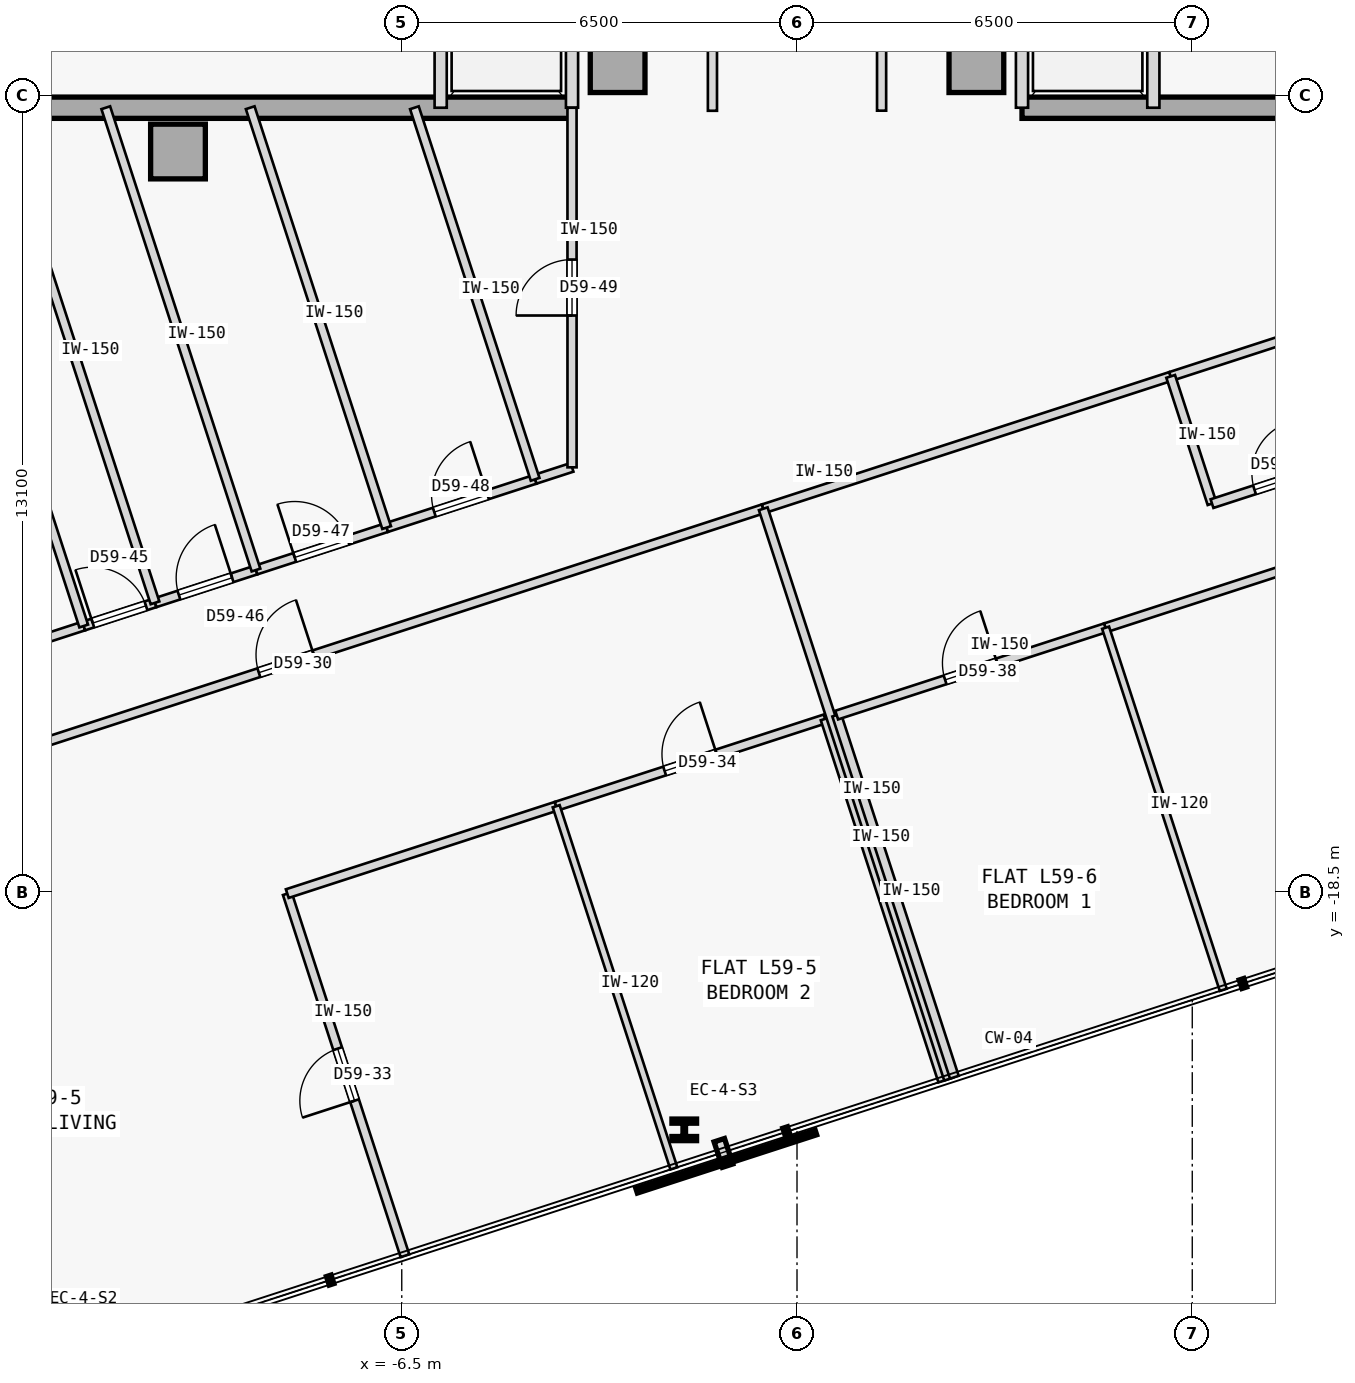
"""IFC4 building model, lengths in metres.
Left out: names, types, materials, properties, quantities, classifications, styles, units other than length and angle.
Written with IfcOpenShell. Run it as: python <this file> out.ifc"""

import sys

from ifc_helpers import new_model, si_unit, direction, frame, frame_2d, origin, origin_2d, place, context, subcontext, project, spatial, rectangle, i_section, extrude, element, fill, save


model = new_model("IFC4")
c1 = context("Model", 3, precision=1e-05, world=origin(), true_north=direction((0.0, 1.0)))
c2 = subcontext(c1, "Body", "Model", "MODEL_VIEW")
j1 = project(units=[si_unit("LENGTHUNIT", "METRE"), si_unit("PLANEANGLEUNIT", "RADIAN")], contexts=[c1])
p1 = place(None, origin())
s1 = spatial("IfcSite", under=j1, at=p1, CompositionType="ELEMENT")
p2 = place(p1, origin())
s2 = spatial("IfcBuilding", under=s1, at=p2, CompositionType="ELEMENT")
p3 = place(p2, frame((0.0, 0.0, 224.3)))
s3 = spatial("IfcBuildingStorey", under=s2, at=p3, CompositionType="ELEMENT", Elevation=224.3)
for number, where, z_axis, x_axis in (
    (1, (-10.18, -6.32, 0.0), (0.0, 0.0, 1.0), (1.0, 0.0, 0.0)),
    (2, (-2.95, -4.9, 0.0), (0.0, 0.0, 1.0), (1.0, 0.0, 0.0)),
    (3, (2.95, -4.9, 0.0), (0.0, 0.0, 1.0), (1.0, 0.0, 0.0)),
):
    element("IfcColumn", number, at=place(p3, frame(where, z_axis=z_axis, x_axis=x_axis)), inside=s3, PredefinedType="COLUMN", context=c2, shape_type="SweptSolid", body=[
        extrude(rectangle(XDim=0.9, YDim=0.9, at=origin_2d()), origin(), (0.0, 0.0, 1.0), 3.35),
    ])
for number, where, z_axis, x_axis in (
    (4, (-14.56, -5.6, 0.0), (0.0, 0.0, 1.0), (1.0, 0.0, 0.0)),
    (5, (3.7, -5.6, 0.0), (0.0, 0.0, 1.0), (1.0, 0.0, 0.0)),
):
    element("IfcWall", number, at=place(p3, frame(where, z_axis=z_axis, x_axis=x_axis)), inside=s3, PredefinedType="SHEAR", context=c2, shape_type="SweptSolid", body=[
        extrude(rectangle(XDim=10.86, YDim=0.35, at=frame_2d((5.43, 0.0))), origin(), (0.0, 0.0, 1.0), 3.125),
    ])
p4 = place(p3, frame((-1.854, -22.409, 0.0), z_axis=(0.0, 0.0, 1.0), x_axis=(1.0, 0.0, 0.0)))
e6 = element("IfcColumn", 6, at=p4, inside=s3, PredefinedType="COLUMN", context=c2, shape_type="SweptSolid", body=[
    extrude(i_section(OverallWidth=0.405, OverallDepth=0.355, WebThickness=0.042, FlangeThickness=0.068, FilletRadius=0.015, at=origin_2d()), origin(), (0.0, 0.0, 1.0), 3.35),
])
for number, where, z_axis, x_axis in (
    (7, (-3.7, -5.6, 0.0), (0.0, 0.0, 1.0), (0.0, 1.0, 0.0)),
    (8, (-5.86, -5.6, 0.0), (0.0, 0.0, 1.0), (0.0, 1.0, 0.0)),
    (9, (3.7, -5.6, 0.0), (0.0, 0.0, 1.0), (0.0, 1.0, 0.0)),
    (10, (5.86, -5.6, 0.0), (0.0, 0.0, 1.0), (0.0, 1.0, 0.0)),
):
    element("IfcWall", number, at=place(p3, frame(where, z_axis=z_axis, x_axis=x_axis)), inside=s3, PredefinedType="STANDARD", context=c2, shape_type="SweptSolid", body=[
        extrude(rectangle(XDim=2.65, YDim=0.2, at=frame_2d((1.325, 0.0))), origin(), (0.0, 0.0, 1.0), 3.125),
    ])
p5 = place(p3, frame((-1.391, -5.65, 0.0), z_axis=(0.0, 0.0, 1.0), x_axis=(-8.6422954e-05, 0.999999996266, 0.0)))
e11 = element("IfcWall", 11, at=p5, inside=s3, PredefinedType="PARTITIONING", context=c2, shape_type="SweptSolid", body=[
    extrude(rectangle(XDim=11.3, YDim=0.15, at=frame_2d((5.65, 0.0))), origin(), (0.0, 0.0, 1.0), 3.125),
])
p6 = place(p5, frame((5.175, 0.0, 0.0)))
e12 = element("IfcOpeningElement", 12, at=p6, cuts=e11, PredefinedType="OPENING", context=c2, shape_type="SweptSolid", body=[
    extrude(rectangle(XDim=0.95, YDim=2.15, at=frame_2d((0.475, 1.075))), frame((0.0, 0.085, 0.0), z_axis=(0.0, -1.0, 0.0), x_axis=(1.0, 0.0, 0.0)), (0.0, 0.0, 1.0), 0.17),
])
p7 = place(p3, frame((1.391, -5.648, 0.0), z_axis=(0.0, 0.0, 1.0), x_axis=(-4.3218947e-05, 0.999999999066, 0.0)))
e13 = element("IfcWall", 13, at=p7, inside=s3, PredefinedType="PARTITIONING", context=c2, shape_type="SweptSolid", body=[
    extrude(rectangle(XDim=11.298, YDim=0.15, at=frame_2d((5.649, 0.0))), origin(), (0.0, 0.0, 1.0), 3.125),
])
p8 = place(p3, frame((-16.242, -17.292, 0.0), z_axis=(0.0, 0.0, 1.0), x_axis=(0.951056800106, 0.309016120894, 0.0)))
e14 = element("IfcWall", 14, at=p8, inside=s3, PredefinedType="PARTITIONING", context=c2, shape_type="SweptSolid", body=[
    extrude(rectangle(XDim=16.494, YDim=0.15, at=frame_2d((8.247, 0.0))), origin(), (0.0, 0.0, 1.0), 3.125),
])
p9 = place(p8, frame((7.772, 0.0, 0.0)))
e15 = element("IfcOpeningElement", 15, at=p9, cuts=e14, PredefinedType="OPENING", context=c2, shape_type="SweptSolid", body=[
    extrude(rectangle(XDim=0.95, YDim=2.15, at=frame_2d((0.475, 1.075))), frame((0.0, 0.085, 0.0), z_axis=(0.0, -1.0, 0.0), x_axis=(1.0, 0.0, 0.0)), (0.0, 0.0, 1.0), 0.17),
])
p10 = place(p3, frame((-0.555, -12.195, 0.0), z_axis=(0.0, 0.0, 1.0), x_axis=(0.951057495482, 0.309013980732, 0.0)))
e16 = element("IfcWall", 16, at=p10, inside=s3, PredefinedType="PARTITIONING", context=c2, shape_type="SweptSolid", body=[
    extrude(rectangle(XDim=7.045, YDim=0.15, at=frame_2d((3.522, 0.0))), origin(), (0.0, 0.0, 1.0), 3.125),
])
p11 = place(p3, frame((6.145, -10.018, 0.0), z_axis=(0.0, 0.0, 1.0), x_axis=(0.951035595692, 0.309081373955, 0.0)))
e17 = element("IfcWall", 17, at=p11, inside=s3, PredefinedType="PARTITIONING", context=c2, shape_type="SweptSolid", body=[
    extrude(rectangle(XDim=2.35, YDim=0.15, at=frame_2d((1.175, 0.0))), origin(), (0.0, 0.0, 1.0), 3.125),
])
p12 = place(p3, frame((-29.45, -19.881, 0.0), z_axis=(0.0, 0.0, 1.0), x_axis=(0.95105650271, 0.309017036186, 0.0)))
e18 = element("IfcWall", 18, at=p12, inside=s3, PredefinedType="PARTITIONING", context=c2, shape_type="SweptSolid", body=[
    extrude(rectangle(XDim=18.632, YDim=0.15, at=frame_2d((9.316, 0.0))), origin(), (0.0, 0.0, 1.0), 3.125),
])
p13 = place(p12, frame((8.856, 0.0, 0.0)))
e19 = element("IfcOpeningElement", 19, at=p13, cuts=e18, PredefinedType="OPENING", context=c2, shape_type="SweptSolid", body=[
    extrude(rectangle(XDim=0.92, YDim=2.15, at=frame_2d((0.46, 1.075))), frame((0.0, 0.085, 0.0), z_axis=(0.0, -1.0, 0.0), x_axis=(1.0, 0.0, 0.0)), (0.0, 0.0, 1.0), 0.17),
])
p14 = place(p3, frame((-11.73, -14.123, 0.0), z_axis=(0.0, 0.0, 1.0), x_axis=(0.951032613602, 0.309090549622, 0.0)))
e20 = element("IfcWall", 20, at=p14, inside=s3, PredefinedType="PARTITIONING", context=c2, shape_type="SweptSolid", body=[
    extrude(rectangle(XDim=1.233, YDim=0.15, at=frame_2d((0.616, 0.0))), origin(), (0.0, 0.0, 1.0), 3.125),
])
p15 = place(p14, frame((0.156, 0.0, 0.0)))
e21 = element("IfcOpeningElement", 21, at=p15, cuts=e20, PredefinedType="OPENING", context=c2, shape_type="SweptSolid", body=[
    extrude(rectangle(XDim=0.92, YDim=2.15, at=frame_2d((0.46, 1.075))), frame((0.0, 0.085, 0.0), z_axis=(0.0, -1.0, 0.0), x_axis=(1.0, 0.0, 0.0)), (0.0, 0.0, 1.0), 0.17),
])
p16 = place(p3, frame((-10.558, -13.742, 0.0), z_axis=(0.0, 0.0, 1.0), x_axis=(0.951060780507, 0.309003870173, 0.0)))
e22 = element("IfcWall", 22, at=p16, inside=s3, PredefinedType="PARTITIONING", context=c2, shape_type="SweptSolid", body=[
    extrude(rectangle(XDim=1.746, YDim=0.15, at=frame_2d((0.873, 0.0))), origin(), (0.0, 0.0, 1.0), 3.125),
])
p17 = place(p16, frame((0.413, 0.0, 0.0)))
e23 = element("IfcOpeningElement", 23, at=p17, cuts=e22, PredefinedType="OPENING", context=c2, shape_type="SweptSolid", body=[
    extrude(rectangle(XDim=0.92, YDim=2.15, at=frame_2d((0.46, 1.075))), frame((0.0, 0.085, 0.0), z_axis=(0.0, -1.0, 0.0), x_axis=(1.0, 0.0, 0.0)), (0.0, 0.0, 1.0), 0.17),
])
p18 = place(p3, frame((-8.897, -13.202, 0.0), z_axis=(0.0, 0.0, 1.0), x_axis=(0.951065832698, 0.308988319964, 0.0)))
e24 = element("IfcWall", 24, at=p18, inside=s3, PredefinedType="PARTITIONING", context=c2, shape_type="SweptSolid", body=[
    extrude(rectangle(XDim=2.259, YDim=0.15, at=frame_2d((1.129, 0.0))), origin(), (0.0, 0.0, 1.0), 3.125),
])
p19 = place(p18, frame((0.669, 0.0, 0.0)))
e25 = element("IfcOpeningElement", 25, at=p19, cuts=e24, PredefinedType="OPENING", context=c2, shape_type="SweptSolid", body=[
    extrude(rectangle(XDim=0.92, YDim=2.15, at=frame_2d((0.46, 1.075))), frame((0.0, 0.085, 0.0), z_axis=(0.0, -1.0, 0.0), x_axis=(1.0, 0.0, 0.0)), (0.0, 0.0, 1.0), 0.17),
])
p20 = place(p3, frame((-6.749, -12.504, 0.0), z_axis=(0.0, 0.0, 1.0), x_axis=(0.951042451835, 0.309060276981, 0.0)))
e26 = element("IfcWall", 26, at=p20, inside=s3, PredefinedType="PARTITIONING", context=c2, shape_type="SweptSolid", body=[
    extrude(rectangle(XDim=2.568, YDim=0.15, at=frame_2d((1.284, 0.0))), origin(), (0.0, 0.0, 1.0), 3.125),
])
p21 = place(p20, frame((0.824, 0.0, 0.0)))
e27 = element("IfcOpeningElement", 27, at=p21, cuts=e26, PredefinedType="OPENING", context=c2, shape_type="SweptSolid", body=[
    extrude(rectangle(XDim=0.92, YDim=2.15, at=frame_2d((0.46, 1.075))), frame((0.0, 0.085, 0.0), z_axis=(0.0, -1.0, 0.0), x_axis=(1.0, 0.0, 0.0)), (0.0, 0.0, 1.0), 0.17),
])
p22 = place(p3, frame((-4.306, -11.711, 0.0), z_axis=(0.0, 0.0, 1.0), x_axis=(0.95110436063, 0.308869705847, 0.0)))
e28 = element("IfcWall", 28, at=p22, inside=s3, PredefinedType="PARTITIONING", context=c2, shape_type="SweptSolid", body=[
    extrude(rectangle(XDim=0.638, YDim=0.15, at=frame_2d((0.319, 0.0))), origin(), (0.0, 0.0, 1.0), 3.125),
])
p23 = place(p3, frame((-3.7, -11.514, 0.0), z_axis=(0.0, 0.0, 1.0), x_axis=(-8.2572974e-05, 0.999999996591, 0.0)))
e29 = element("IfcWall", 29, at=p23, inside=s3, PredefinedType="PARTITIONING", context=c2, shape_type="SweptSolid", body=[
    extrude(rectangle(XDim=5.913, YDim=0.15, at=frame_2d((2.957, 0.0))), origin(), (0.0, 0.0, 1.0), 3.125),
])
p24 = place(p23, frame((2.497, 0.0, 0.0)))
e30 = element("IfcOpeningElement", 30, at=p24, cuts=e29, PredefinedType="OPENING", context=c2, shape_type="SweptSolid", body=[
    extrude(rectangle(XDim=0.92, YDim=2.15, at=frame_2d((0.46, 1.075))), frame((0.0, 0.085, 0.0), z_axis=(0.0, -1.0, 0.0), x_axis=(1.0, 0.0, 0.0)), (0.0, 0.0, 1.0), 0.17),
])
p25 = place(p3, frame((-6.448, -24.479, 0.0), z_axis=(0.0, 0.0, 1.0), x_axis=(-0.309049046683, 0.951046101272, 0.0)))
e31 = element("IfcWall", 31, at=p25, inside=s3, PredefinedType="PARTITIONING", context=c2, shape_type="SweptSolid", body=[
    extrude(rectangle(XDim=6.262, YDim=0.15, at=frame_2d((3.131, 0.0))), origin(), (0.0, 0.0, 1.0), 3.125),
])
p26 = place(p25, frame((2.681, 0.0, 0.0)))
e32 = element("IfcOpeningElement", 32, at=p26, cuts=e31, PredefinedType="OPENING", context=c2, shape_type="SweptSolid", body=[
    extrude(rectangle(XDim=0.9, YDim=2.15, at=frame_2d((0.45, 1.075))), frame((0.0, 0.085, 0.0), z_axis=(0.0, -1.0, 0.0), x_axis=(1.0, 0.0, 0.0)), (0.0, 0.0, 1.0), 0.17),
])
p27 = place(p3, frame((-8.383, -18.524, 0.0), z_axis=(0.0, 0.0, 1.0), x_axis=(0.951055286502, 0.309020779263, 0.0)))
e33 = element("IfcWall", 33, at=p27, inside=s3, PredefinedType="PARTITIONING", context=c2, shape_type="SweptSolid", body=[
    extrude(rectangle(XDim=4.65, YDim=0.15, at=frame_2d((2.325, 0.0))), origin(), (0.0, 0.0, 1.0), 3.125),
])
p28 = place(p3, frame((-3.96, -17.087, 0.0), z_axis=(0.0, 0.0, 1.0), x_axis=(0.951050272606, 0.309036209813, 0.0)))
e34 = element("IfcWall", 34, at=p28, inside=s3, PredefinedType="PARTITIONING", context=c2, shape_type="SweptSolid", body=[
    extrude(rectangle(XDim=4.65, YDim=0.15, at=frame_2d((2.325, 0.0))), origin(), (0.0, 0.0, 1.0), 3.125),
])
p29 = place(p28, frame((1.875, 0.0, 0.0)))
e35 = element("IfcOpeningElement", 35, at=p29, cuts=e34, PredefinedType="OPENING", context=c2, shape_type="SweptSolid", body=[
    extrude(rectangle(XDim=0.9, YDim=2.15, at=frame_2d((0.45, 1.075))), frame((0.0, 0.085, 0.0), z_axis=(0.0, -1.0, 0.0), x_axis=(1.0, 0.0, 0.0)), (0.0, 0.0, 1.0), 0.17),
])
p30 = place(p3, frame((2.397, -21.605, 0.0), z_axis=(0.0, 0.0, 1.0), x_axis=(-0.309013782848, 0.951057559777, 0.0)))
e36 = element("IfcWall", 36, at=p30, inside=s3, PredefinedType="PARTITIONING", context=c2, shape_type="SweptSolid", body=[
    extrude(rectangle(XDim=6.262, YDim=0.15, at=frame_2d((3.131, 0.0))), origin(), (0.0, 0.0, 1.0), 3.125),
])
p31 = place(p3, frame((2.492, -21.575, 0.0), z_axis=(0.0, 0.0, 1.0), x_axis=(-0.308999867152, 0.951062081097, 0.0)))
e37 = element("IfcWall", 37, at=p31, inside=s3, PredefinedType="PARTITIONING", context=c2, shape_type="SweptSolid", body=[
    extrude(rectangle(XDim=9.862, YDim=0.15, at=frame_2d((4.931, 0.0))), origin(), (0.0, 0.0, 1.0), 3.125),
])
p32 = place(p3, frame((-2.025, -23.042, 0.0), z_axis=(0.0, 0.0, 1.0), x_axis=(-0.309013782848, 0.951057559777, 0.0)))
e38 = element("IfcWall", 38, at=p32, inside=s3, PredefinedType="PARTITIONING", context=c2, shape_type="SweptSolid", body=[
    extrude(rectangle(XDim=6.262, YDim=0.12, at=frame_2d((3.131, 0.0))), origin(), (0.0, 0.0, 1.0), 3.125),
])
p33 = place(p3, frame((6.825, -12.111, 0.0), z_axis=(0.0, 0.0, 1.0), x_axis=(-0.308960600764, 0.951074837842, 0.0)))
e39 = element("IfcWall", 39, at=p33, inside=s3, PredefinedType="PARTITIONING", context=c2, shape_type="SweptSolid", body=[
    extrude(rectangle(XDim=2.2, YDim=0.15, at=frame_2d((1.1, 0.0))), origin(), (0.0, 0.0, 1.0), 3.125),
])
p34 = place(p3, frame((6.825, -12.111, 0.0), z_axis=(0.0, 0.0, 1.0), x_axis=(0.951076048914, 0.308956872689, 0.0)))
e40 = element("IfcWall", 40, at=p34, inside=s3, PredefinedType="PARTITIONING", context=c2, shape_type="SweptSolid", body=[
    extrude(rectangle(XDim=2.35, YDim=0.15, at=frame_2d((1.175, 0.0))), origin(), (0.0, 0.0, 1.0), 3.125),
])
p35 = place(p34, frame((0.735, 0.0, 0.0)))
e41 = element("IfcOpeningElement", 41, at=p35, cuts=e40, PredefinedType="OPENING", context=c2, shape_type="SweptSolid", body=[
    extrude(rectangle(XDim=0.88, YDim=2.15, at=frame_2d((0.44, 1.075))), frame((0.0, 0.085, 0.0), z_axis=(0.0, -1.0, 0.0), x_axis=(1.0, 0.0, 0.0)), (0.0, 0.0, 1.0), 0.17),
])
p36 = place(p3, frame((2.587, -21.544, 0.0), z_axis=(0.0, 0.0, 1.0), x_axis=(-0.309013782848, 0.951057559777, 0.0)))
e42 = element("IfcWall", 42, at=p36, inside=s3, PredefinedType="PARTITIONING", context=c2, shape_type="SweptSolid", body=[
    extrude(rectangle(XDim=6.262, YDim=0.15, at=frame_2d((3.131, 0.0))), origin(), (0.0, 0.0, 1.0), 3.125),
])
p37 = place(p3, frame((0.652, -15.588, 0.0), z_axis=(0.0, 0.0, 1.0), x_axis=(0.951065702951, 0.308988719326, 0.0)))
e43 = element("IfcWall", 43, at=p37, inside=s3, PredefinedType="PARTITIONING", context=c2, shape_type="SweptSolid", body=[
    extrude(rectangle(XDim=4.65, YDim=0.15, at=frame_2d((2.325, 0.0))), origin(), (0.0, 0.0, 1.0), 3.125),
])
p38 = place(p37, frame((1.875, 0.0, 0.0)))
e44 = element("IfcOpeningElement", 44, at=p38, cuts=e43, PredefinedType="OPENING", context=c2, shape_type="SweptSolid", body=[
    extrude(rectangle(XDim=0.9, YDim=2.15, at=frame_2d((0.45, 1.075))), frame((0.0, 0.085, 0.0), z_axis=(0.0, -1.0, 0.0), x_axis=(1.0, 0.0, 0.0)), (0.0, 0.0, 1.0), 0.17),
])
p39 = place(p3, frame((5.075, -14.151, 0.0), z_axis=(0.0, 0.0, 1.0), x_axis=(0.951055286502, 0.309020779263, 0.0)))
e45 = element("IfcWall", 45, at=p39, inside=s3, PredefinedType="PARTITIONING", context=c2, shape_type="SweptSolid", body=[
    extrude(rectangle(XDim=4.65, YDim=0.15, at=frame_2d((2.325, 0.0))), origin(), (0.0, 0.0, 1.0), 3.125),
])
p40 = place(p3, frame((7.01, -20.107, 0.0), z_axis=(0.0, 0.0, 1.0), x_axis=(-0.30902524124, 0.951053836687, 0.0)))
e46 = element("IfcWall", 46, at=p40, inside=s3, PredefinedType="PARTITIONING", context=c2, shape_type="SweptSolid", body=[
    extrude(rectangle(XDim=6.262, YDim=0.12, at=frame_2d((3.131, 0.0))), origin(), (0.0, 0.0, 1.0), 3.125),
])
p41 = place(p3, frame((-11.73, -14.123, 0.0), z_axis=(0.0, 0.0, 1.0), x_axis=(-0.309062621189, 0.951041690035, 0.0)))
e47 = element("IfcWall", 47, at=p41, inside=s3, PredefinedType="PARTITIONING", context=c2, shape_type="SweptSolid", body=[
    extrude(rectangle(XDim=2.354, YDim=0.15, at=frame_2d((1.177, 0.0))), origin(), (0.0, 0.0, 1.0), 3.125),
])
p42 = place(p3, frame((-10.558, -13.742, 0.0), z_axis=(0.0, 0.0, 1.0), x_axis=(-0.309023521796, 0.951054395383, 0.0)))
e48 = element("IfcWall", 48, at=p42, inside=s3, PredefinedType="PARTITIONING", context=c2, shape_type="SweptSolid", body=[
    extrude(rectangle(XDim=8.561, YDim=0.15, at=frame_2d((4.28, 0.0))), origin(), (0.0, 0.0, 1.0), 3.125),
])
p43 = place(p3, frame((-8.897, -13.202, 0.0), z_axis=(0.0, 0.0, 1.0), x_axis=(-0.309008036968, 0.951059426687, 0.0)))
e49 = element("IfcWall", 49, at=p43, inside=s3, PredefinedType="PARTITIONING", context=c2, shape_type="SweptSolid", body=[
    extrude(rectangle(XDim=7.994, YDim=0.15, at=frame_2d((3.997, 0.0))), origin(), (0.0, 0.0, 1.0), 3.125),
])
p44 = place(p3, frame((-6.749, -12.504, 0.0), z_axis=(0.0, 0.0, 1.0), x_axis=(-0.309005471061, 0.95106026037, 0.0)))
e50 = element("IfcWall", 50, at=p44, inside=s3, PredefinedType="PARTITIONING", context=c2, shape_type="SweptSolid", body=[
    extrude(rectangle(XDim=7.26, YDim=0.15, at=frame_2d((3.63, 0.0))), origin(), (0.0, 0.0, 1.0), 3.125),
])
p45 = place(p3, frame((-4.306, -11.711, 0.0), z_axis=(0.0, 0.0, 1.0), x_axis=(-0.309048266124, 0.951046354919, 0.0)))
e51 = element("IfcWall", 51, at=p45, inside=s3, PredefinedType="PARTITIONING", context=c2, shape_type="SweptSolid", body=[
    extrude(rectangle(XDim=6.425, YDim=0.15, at=frame_2d((3.212, 0.0))), origin(), (0.0, 0.0, 1.0), 3.125),
])
p46 = place(p9, origin())
e52 = element("IfcDoor", 52, at=p46, inside=s3, OperationType="SINGLE_SWING_RIGHT", PredefinedType="DOOR", context=c2, shape_type="SweptSolid", body=[
    extrude(rectangle(XDim=0.95, YDim=2.15, at=frame_2d((0.475, 1.075))), frame((0.0, 0.025, 0.0), z_axis=(0.0, -1.0, 0.0), x_axis=(1.0, 0.0, 0.0)), (0.0, 0.0, 1.0), 0.05),
])
fill(e15, e52)
p47 = place(p26, origin())
e53 = element("IfcDoor", 53, at=p47, inside=s3, OperationType="SINGLE_SWING_LEFT", PredefinedType="DOOR", context=c2, shape_type="SweptSolid", body=[
    extrude(rectangle(XDim=0.9, YDim=2.15, at=frame_2d((0.45, 1.075))), frame((0.0, 0.025, 0.0), z_axis=(0.0, -1.0, 0.0), x_axis=(1.0, 0.0, 0.0)), (0.0, 0.0, 1.0), 0.05),
])
fill(e32, e53)
p48 = place(p29, origin())
e54 = element("IfcDoor", 54, at=p48, inside=s3, OperationType="SINGLE_SWING_RIGHT", PredefinedType="DOOR", context=c2, shape_type="SweptSolid", body=[
    extrude(rectangle(XDim=0.9, YDim=2.15, at=frame_2d((0.45, 1.075))), frame((0.0, 0.025, 0.0), z_axis=(0.0, -1.0, 0.0), x_axis=(1.0, 0.0, 0.0)), (0.0, 0.0, 1.0), 0.05),
])
fill(e35, e54)
p49 = place(p35, origin())
e55 = element("IfcDoor", 55, at=p49, inside=s3, OperationType="SINGLE_SWING_RIGHT", PredefinedType="DOOR", context=c2, shape_type="SweptSolid", body=[
    extrude(rectangle(XDim=0.88, YDim=2.15, at=frame_2d((0.44, 1.075))), frame((0.0, 0.025, 0.0), z_axis=(0.0, -1.0, 0.0), x_axis=(1.0, 0.0, 0.0)), (0.0, 0.0, 1.0), 0.05),
])
fill(e41, e55)
p50 = place(p38, origin())
e56 = element("IfcDoor", 56, at=p50, inside=s3, OperationType="SINGLE_SWING_RIGHT", PredefinedType="DOOR", context=c2, shape_type="SweptSolid", body=[
    extrude(rectangle(XDim=0.9, YDim=2.15, at=frame_2d((0.45, 1.075))), frame((0.0, 0.025, 0.0), z_axis=(0.0, -1.0, 0.0), x_axis=(1.0, 0.0, 0.0)), (0.0, 0.0, 1.0), 0.05),
])
fill(e44, e56)
p51 = place(p15, origin())
e57 = element("IfcDoor", 57, at=p51, inside=s3, OperationType="SINGLE_SWING_LEFT", PredefinedType="DOOR", context=c2, shape_type="SweptSolid", body=[
    extrude(rectangle(XDim=0.92, YDim=2.15, at=frame_2d((0.46, 1.075))), frame((0.0, 0.025, 0.0), z_axis=(0.0, -1.0, 0.0), x_axis=(1.0, 0.0, 0.0)), (0.0, 0.0, 1.0), 0.05),
])
fill(e21, e57)
p52 = place(p17, origin())
e58 = element("IfcDoor", 58, at=p52, inside=s3, OperationType="SINGLE_SWING_RIGHT", PredefinedType="DOOR", context=c2, shape_type="SweptSolid", body=[
    extrude(rectangle(XDim=0.92, YDim=2.15, at=frame_2d((0.46, 1.075))), frame((0.0, 0.025, 0.0), z_axis=(0.0, -1.0, 0.0), x_axis=(1.0, 0.0, 0.0)), (0.0, 0.0, 1.0), 0.05),
])
fill(e23, e58)
p53 = place(p19, origin())
e59 = element("IfcDoor", 59, at=p53, inside=s3, OperationType="SINGLE_SWING_LEFT", PredefinedType="DOOR", context=c2, shape_type="SweptSolid", body=[
    extrude(rectangle(XDim=0.92, YDim=2.15, at=frame_2d((0.46, 1.075))), frame((0.0, 0.025, 0.0), z_axis=(0.0, -1.0, 0.0), x_axis=(1.0, 0.0, 0.0)), (0.0, 0.0, 1.0), 0.05),
])
fill(e25, e59)
p54 = place(p21, origin())
e60 = element("IfcDoor", 60, at=p54, inside=s3, OperationType="SINGLE_SWING_RIGHT", PredefinedType="DOOR", context=c2, shape_type="SweptSolid", body=[
    extrude(rectangle(XDim=0.92, YDim=2.15, at=frame_2d((0.46, 1.075))), frame((0.0, 0.025, 0.0), z_axis=(0.0, -1.0, 0.0), x_axis=(1.0, 0.0, 0.0)), (0.0, 0.0, 1.0), 0.05),
])
fill(e27, e60)
p55 = place(p24, origin())
e61 = element("IfcDoor", 61, at=p55, inside=s3, OperationType="SINGLE_SWING_LEFT", PredefinedType="DOOR", context=c2, shape_type="SweptSolid", body=[
    extrude(rectangle(XDim=0.92, YDim=2.15, at=frame_2d((0.46, 1.075))), frame((0.0, 0.025, 0.0), z_axis=(0.0, -1.0, 0.0), x_axis=(1.0, 0.0, 0.0)), (0.0, 0.0, 1.0), 0.05),
])
fill(e30, e61)
save(model, sys.argv[1])
